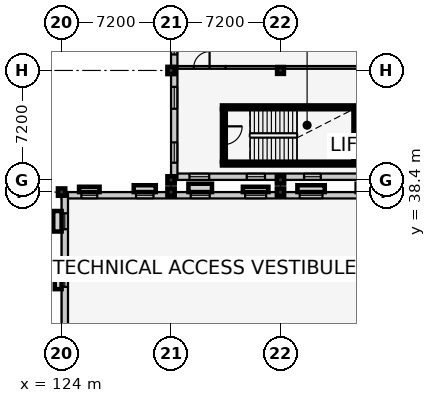
"""IFC4 building model, lengths in metres.
Left out: names, types, materials, properties, quantities, classifications, styles, units other than length and angle.
Written with IfcOpenShell. Run it as: python <this file> out.ifc"""

import sys

from ifc_helpers import new_model, si_unit, direction, frame, frame_2d, origin, origin_2d, place, context, subcontext, project, spatial, rectangle, extrude, element, fill, save


model = new_model("IFC4")
c1 = context("Model", 3, precision=1e-05, world=origin(), true_north=direction((0.0, 1.0)))
c2 = subcontext(c1, "Body", "Model", "MODEL_VIEW")
j1 = project(units=[si_unit("LENGTHUNIT", "METRE"), si_unit("PLANEANGLEUNIT", "RADIAN")], contexts=[c1])
p1 = place(None, origin())
s1 = spatial("IfcSite", under=j1, at=p1, CompositionType="ELEMENT")
p2 = place(p1, origin())
s2 = spatial("IfcBuilding", under=s1, at=p2, CompositionType="ELEMENT")
p3 = place(p2, frame((0.0, 0.0, 9.6)))
s3 = spatial("IfcBuildingStorey", under=s2, at=p3, CompositionType="ELEMENT", Elevation=9.6)
for number, where, z_axis, x_axis in (
    (1, (124.0, 38.4, 0.0), (0.0, 0.0, 1.0), (1.0, 0.0, 0.0)),
    (2, (131.2, 38.4, 0.0), (0.0, 0.0, 1.0), (1.0, 0.0, 0.0)),
    (3, (138.4, 38.4, 0.0), (0.0, 0.0, 1.0), (1.0, 0.0, 0.0)),
    (4, (131.2, 39.2, 0.0), (0.0, 0.0, 1.0), (1.0, 0.0, 0.0)),
    (5, (131.2, 46.4, 0.0), (0.0, 0.0, 1.0), (1.0, 0.0, 0.0)),
    (6, (138.4, 39.2, 0.0), (0.0, 0.0, 1.0), (1.0, 0.0, 0.0)),
):
    element("IfcColumn", number, at=place(p3, frame(where, z_axis=z_axis, x_axis=x_axis)), inside=s3, PredefinedType="COLUMN", context=c2, shape_type="SweptSolid", body=[
        extrude(rectangle(XDim=0.48, YDim=0.48, at=origin_2d()), origin(), (0.0, 0.0, 1.0), 4.2),
    ])
p4 = place(p3, frame((138.4, 46.4, 0.0), z_axis=(0.0, 0.0, 1.0), x_axis=(1.0, 0.0, 0.0)))
e7 = element("IfcColumn", 7, at=p4, inside=s3, PredefinedType="COLUMN", context=c2, shape_type="SweptSolid", body=[
    extrude(rectangle(XDim=0.45, YDim=0.45, at=origin_2d()), origin(), (0.0, 0.0, 1.0), 4.2),
])
p5 = place(p3, frame((124.0, 38.19, 0.0), z_axis=(0.0, 0.0, 1.0), x_axis=(1.0, 0.0, 0.0)))
e8 = element("IfcWall", 8, at=p5, inside=s3, PredefinedType="SOLIDWALL", context=c2, shape_type="SweptSolid", body=[
    extrude(rectangle(XDim=62.0, YDim=0.42, at=frame_2d((31.0, 0.0))), origin(), (0.0, 0.0, 1.0), 3.675),
])
p6 = place(p5, frame((1.299, 0.0, 0.9)))
e9 = element("IfcOpeningElement", 9, at=p6, cuts=e8, PredefinedType="OPENING", context=c2, shape_type="SweptSolid", body=[
    extrude(rectangle(XDim=1.05, YDim=1.6, at=frame_2d((0.525, 0.8))), frame((0.0, 0.222, 0.0), z_axis=(0.0, -1.0, 0.0), x_axis=(1.0, 0.0, 0.0)), (0.0, 0.0, 1.0), 0.444),
])
p7 = place(p5, frame((4.896, 0.0, 0.9)))
e10 = element("IfcOpeningElement", 10, at=p7, cuts=e8, PredefinedType="OPENING", context=c2, shape_type="SweptSolid", body=[
    extrude(rectangle(XDim=1.15, YDim=1.6, at=frame_2d((0.575, 0.8))), frame((0.0, 0.222, 0.0), z_axis=(0.0, -1.0, 0.0), x_axis=(1.0, 0.0, 0.0)), (0.0, 0.0, 1.0), 0.444),
])
p8 = place(p5, frame((8.493, 0.0, 0.9)))
e11 = element("IfcOpeningElement", 11, at=p8, cuts=e8, PredefinedType="OPENING", context=c2, shape_type="SweptSolid", body=[
    extrude(rectangle(XDim=1.25, YDim=1.6, at=frame_2d((0.625, 0.8))), frame((0.0, 0.222, 0.0), z_axis=(0.0, -1.0, 0.0), x_axis=(1.0, 0.0, 0.0)), (0.0, 0.0, 1.0), 0.444),
])
p9 = place(p5, frame((12.075, 0.0, 0.9)))
e12 = element("IfcOpeningElement", 12, at=p9, cuts=e8, PredefinedType="OPENING", context=c2, shape_type="SweptSolid", body=[
    extrude(rectangle(XDim=1.38, YDim=1.6, at=frame_2d((0.69, 0.8))), frame((0.0, 0.222, 0.0), z_axis=(0.0, -1.0, 0.0), x_axis=(1.0, 0.0, 0.0)), (0.0, 0.0, 1.0), 0.444),
])
p10 = place(p5, frame((15.662, 0.0, 0.9)))
e13 = element("IfcOpeningElement", 13, at=p10, cuts=e8, PredefinedType="OPENING", context=c2, shape_type="SweptSolid", body=[
    extrude(rectangle(XDim=1.5, YDim=1.6, at=frame_2d((0.75, 0.8))), frame((0.0, 0.222, 0.0), z_axis=(0.0, -1.0, 0.0), x_axis=(1.0, 0.0, 0.0)), (0.0, 0.0, 1.0), 0.444),
])
p11 = place(p5, frame((19.559, 0.0, 0.9)))
e14 = element("IfcOpeningElement", 14, at=p11, cuts=e8, PredefinedType="OPENING", context=c2, shape_type="SweptSolid", body=[
    extrude(rectangle(XDim=1.0, YDim=1.75, at=frame_2d((0.5, 0.875))), frame((0.0, 0.222, 0.0), z_axis=(0.0, -1.0, 0.0), x_axis=(1.0, 0.0, 0.0)), (0.0, 0.0, 1.0), 0.444),
])
p12 = place(p5, frame((26.733, 0.0, 0.9)))
e15 = element("IfcOpeningElement", 15, at=p12, cuts=e8, PredefinedType="OPENING", context=c2, shape_type="SweptSolid", body=[
    extrude(rectangle(XDim=1.24, YDim=1.75, at=frame_2d((0.62, 0.875))), frame((0.0, 0.222, 0.0), z_axis=(0.0, -1.0, 0.0), x_axis=(1.0, 0.0, 0.0)), (0.0, 0.0, 1.0), 0.444),
])
p13 = place(p5, frame((37.544, 0.0, 0.9)))
e16 = element("IfcOpeningElement", 16, at=p13, cuts=e8, PredefinedType="OPENING", context=c2, shape_type="SweptSolid", body=[
    extrude(rectangle(XDim=1.5, YDim=1.75, at=frame_2d((0.75, 0.875))), frame((0.0, 0.222, 0.0), z_axis=(0.0, -1.0, 0.0), x_axis=(1.0, 0.0, 0.0)), (0.0, 0.0, 1.0), 0.444),
])
p14 = place(p5, frame((48.685, 0.0, 0.9)))
e17 = element("IfcOpeningElement", 17, at=p14, cuts=e8, PredefinedType="OPENING", context=c2, shape_type="SweptSolid", body=[
    extrude(rectangle(XDim=1.1, YDim=1.35, at=frame_2d((0.55, 0.675))), frame((0.0, 0.222, 0.0), z_axis=(0.0, -1.0, 0.0), x_axis=(1.0, 0.0, 0.0)), (0.0, 0.0, 1.0), 0.444),
])
p15 = place(p5, frame((59.477, 0.0, 0.9)))
e18 = element("IfcOpeningElement", 18, at=p15, cuts=e8, PredefinedType="OPENING", context=c2, shape_type="SweptSolid", body=[
    extrude(rectangle(XDim=1.4, YDim=1.35, at=frame_2d((0.7, 0.675))), frame((0.0, 0.222, 0.0), z_axis=(0.0, -1.0, 0.0), x_axis=(1.0, 0.0, 0.0)), (0.0, 0.0, 1.0), 0.444),
])
p16 = place(p3, frame((124.21, 0.0, 0.0), z_axis=(0.0, 0.0, 1.0), x_axis=(0.0, 1.0, 0.0)))
e19 = element("IfcWall", 19, at=p16, inside=s3, PredefinedType="SOLIDWALL", context=c2, shape_type="SweptSolid", body=[
    extrude(rectangle(XDim=38.4, YDim=0.42, at=frame_2d((19.2, 0.0))), origin(), (0.0, 0.0, 1.0), 3.825),
])
p17 = place(p16, frame((32.165, 0.0, 0.9)))
e20 = element("IfcOpeningElement", 20, at=p17, cuts=e19, PredefinedType="OPENING", context=c2, shape_type="SweptSolid", body=[
    extrude(rectangle(XDim=0.95, YDim=1.45, at=frame_2d((0.475, 0.725))), frame((0.0, 0.222, 0.0), z_axis=(0.0, -1.0, 0.0), x_axis=(1.0, 0.0, 0.0)), (0.0, 0.0, 1.0), 0.444),
])
p18 = place(p16, frame((35.955, 0.0, 0.9)))
e21 = element("IfcOpeningElement", 21, at=p18, cuts=e19, PredefinedType="OPENING", context=c2, shape_type="SweptSolid", body=[
    extrude(rectangle(XDim=1.05, YDim=1.45, at=frame_2d((0.525, 0.725))), frame((0.0, 0.222, 0.0), z_axis=(0.0, -1.0, 0.0), x_axis=(1.0, 0.0, 0.0)), (0.0, 0.0, 1.0), 0.444),
])
p19 = place(p3, frame((168.4, 39.41, 0.0), z_axis=(0.0, 0.0, 1.0), x_axis=(-1.0, 0.0, 0.0)))
e22 = element("IfcWall", 22, at=p19, inside=s3, PredefinedType="SOLIDWALL", context=c2, shape_type="SweptSolid", body=[
    extrude(rectangle(XDim=37.2, YDim=0.42, at=frame_2d((18.6, 0.0))), origin(), (0.0, 0.0, 1.0), 3.115),
])
p20 = place(p19, frame((1.3, 0.0, 0.9)))
e23 = element("IfcOpeningElement", 23, at=p20, cuts=e22, PredefinedType="OPENING", context=c2, shape_type="SweptSolid", body=[
    extrude(rectangle(XDim=1.12, YDim=1.75, at=frame_2d((0.56, 0.875))), frame((0.0, 0.222, 0.0), z_axis=(0.0, -1.0, 0.0), x_axis=(1.0, 0.0, 0.0)), (0.0, 0.0, 1.0), 0.444),
])
p21 = place(p19, frame((4.96, 0.0, 0.9)))
e24 = element("IfcOpeningElement", 24, at=p21, cuts=e22, PredefinedType="OPENING", context=c2, shape_type="SweptSolid", body=[
    extrude(rectangle(XDim=1.24, YDim=1.75, at=frame_2d((0.62, 0.875))), frame((0.0, 0.222, 0.0), z_axis=(0.0, -1.0, 0.0), x_axis=(1.0, 0.0, 0.0)), (0.0, 0.0, 1.0), 0.444),
])
p22 = place(p19, frame((12.3, 0.0, 0.9)))
e25 = element("IfcOpeningElement", 25, at=p22, cuts=e22, PredefinedType="OPENING", context=c2, shape_type="SweptSolid", body=[
    extrude(rectangle(XDim=1.44, YDim=1.75, at=frame_2d((0.72, 0.875))), frame((0.0, 0.222, 0.0), z_axis=(0.0, -1.0, 0.0), x_axis=(1.0, 0.0, 0.0)), (0.0, 0.0, 1.0), 0.444),
])
p23 = place(p19, frame((20.01, 0.0, 0.9)))
e26 = element("IfcOpeningElement", 26, at=p23, cuts=e22, PredefinedType="OPENING", context=c2, shape_type="SweptSolid", body=[
    extrude(rectangle(XDim=0.9, YDim=1.35, at=frame_2d((0.45, 0.675))), frame((0.0, 0.222, 0.0), z_axis=(0.0, -1.0, 0.0), x_axis=(1.0, 0.0, 0.0)), (0.0, 0.0, 1.0), 0.444),
])
p24 = place(p19, frame((23.68, 0.0, 0.9)))
e27 = element("IfcOpeningElement", 27, at=p24, cuts=e22, PredefinedType="OPENING", context=c2, shape_type="SweptSolid", body=[
    extrude(rectangle(XDim=1.0, YDim=1.35, at=frame_2d((0.5, 0.675))), frame((0.0, 0.222, 0.0), z_axis=(0.0, -1.0, 0.0), x_axis=(1.0, 0.0, 0.0)), (0.0, 0.0, 1.0), 0.444),
])
p25 = place(p19, frame((27.35, 0.0, 0.9)))
e28 = element("IfcOpeningElement", 28, at=p25, cuts=e22, PredefinedType="OPENING", context=c2, shape_type="SweptSolid", body=[
    extrude(rectangle(XDim=1.1, YDim=1.35, at=frame_2d((0.55, 0.675))), frame((0.0, 0.222, 0.0), z_axis=(0.0, -1.0, 0.0), x_axis=(1.0, 0.0, 0.0)), (0.0, 0.0, 1.0), 0.444),
])
p26 = place(p19, frame((31.02, 0.0, 0.9)))
e29 = element("IfcOpeningElement", 29, at=p26, cuts=e22, PredefinedType="OPENING", context=c2, shape_type="SweptSolid", body=[
    extrude(rectangle(XDim=1.2, YDim=1.35, at=frame_2d((0.6, 0.675))), frame((0.0, 0.222, 0.0), z_axis=(0.0, -1.0, 0.0), x_axis=(1.0, 0.0, 0.0)), (0.0, 0.0, 1.0), 0.444),
])
p27 = place(p19, frame((34.69, 0.0, 0.9)))
e30 = element("IfcOpeningElement", 30, at=p27, cuts=e22, PredefinedType="OPENING", context=c2, shape_type="SweptSolid", body=[
    extrude(rectangle(XDim=1.3, YDim=1.35, at=frame_2d((0.65, 0.675))), frame((0.0, 0.222, 0.0), z_axis=(0.0, -1.0, 0.0), x_axis=(1.0, 0.0, 0.0)), (0.0, 0.0, 1.0), 0.444),
])
p28 = place(p3, frame((131.41, 39.2, 0.0), z_axis=(0.0, 0.0, 1.0), x_axis=(0.0, 1.0, 0.0)))
e31 = element("IfcWall", 31, at=p28, inside=s3, PredefinedType="SOLIDWALL", context=c2, shape_type="SweptSolid", body=[
    extrude(rectangle(XDim=21.6, YDim=0.42, at=frame_2d((10.8, 0.0))), origin(), (0.0, 0.0, 1.0), 3.355),
])
p29 = place(p28, frame((1.13, 0.0, 0.9)))
e32 = element("IfcOpeningElement", 32, at=p29, cuts=e31, PredefinedType="OPENING", context=c2, shape_type="SweptSolid", body=[
    extrude(rectangle(XDim=1.34, YDim=1.75, at=frame_2d((0.67, 0.875))), frame((0.0, 0.222, 0.0), z_axis=(0.0, -1.0, 0.0), x_axis=(1.0, 0.0, 0.0)), (0.0, 0.0, 1.0), 0.444),
])
p30 = place(p28, frame((4.68, 0.0, 0.9)))
e33 = element("IfcOpeningElement", 33, at=p30, cuts=e31, PredefinedType="OPENING", context=c2, shape_type="SweptSolid", body=[
    extrude(rectangle(XDim=1.44, YDim=1.75, at=frame_2d((0.72, 0.875))), frame((0.0, 0.222, 0.0), z_axis=(0.0, -1.0, 0.0), x_axis=(1.0, 0.0, 0.0)), (0.0, 0.0, 1.0), 0.444),
])
p31 = place(p28, frame((8.25, 0.0, 0.9)))
e34 = element("IfcOpeningElement", 34, at=p31, cuts=e31, PredefinedType="OPENING", context=c2, shape_type="SweptSolid", body=[
    extrude(rectangle(XDim=1.5, YDim=1.75, at=frame_2d((0.75, 0.875))), frame((0.0, 0.222, 0.0), z_axis=(0.0, -1.0, 0.0), x_axis=(1.0, 0.0, 0.0)), (0.0, 0.0, 1.0), 0.444),
])
p32 = place(p28, frame((12.15, 0.0, 0.9)))
e35 = element("IfcOpeningElement", 35, at=p32, cuts=e31, PredefinedType="OPENING", context=c2, shape_type="SweptSolid", body=[
    extrude(rectangle(XDim=0.9, YDim=1.35, at=frame_2d((0.45, 0.675))), frame((0.0, 0.222, 0.0), z_axis=(0.0, -1.0, 0.0), x_axis=(1.0, 0.0, 0.0)), (0.0, 0.0, 1.0), 0.444),
])
p33 = place(p28, frame((15.7, 0.0, 0.9)))
e36 = element("IfcOpeningElement", 36, at=p33, cuts=e31, PredefinedType="OPENING", context=c2, shape_type="SweptSolid", body=[
    extrude(rectangle(XDim=1.0, YDim=1.35, at=frame_2d((0.5, 0.675))), frame((0.0, 0.222, 0.0), z_axis=(0.0, -1.0, 0.0), x_axis=(1.0, 0.0, 0.0)), (0.0, 0.0, 1.0), 0.444),
])
p34 = place(p28, frame((19.25, 0.0, 0.9)))
e37 = element("IfcOpeningElement", 37, at=p34, cuts=e31, PredefinedType="OPENING", context=c2, shape_type="SweptSolid", body=[
    extrude(rectangle(XDim=1.1, YDim=1.35, at=frame_2d((0.55, 0.675))), frame((0.0, 0.222, 0.0), z_axis=(0.0, -1.0, 0.0), x_axis=(1.0, 0.0, 0.0)), (0.0, 0.0, 1.0), 0.444),
])
p35 = place(p3, frame((134.55, 40.275, 0.0), z_axis=(0.0, 0.0, 1.0), x_axis=(1.0, 0.0, 0.0)))
e38 = element("IfcWall", 38, at=p35, inside=s3, PredefinedType="SHEAR", context=c2, shape_type="SweptSolid", body=[
    extrude(rectangle(XDim=9.47, YDim=0.25, at=frame_2d((4.735, 0.0))), origin(), (0.0, 0.0, 1.0), 3.96),
])
p36 = place(p3, frame((143.45, 43.975, 0.0), z_axis=(0.0, 0.0, 1.0), x_axis=(-1.0, 0.0, 0.0)))
e39 = element("IfcWall", 39, at=p36, inside=s3, PredefinedType="SHEAR", context=c2, shape_type="SweptSolid", body=[
    extrude(rectangle(XDim=8.9, YDim=0.25, at=frame_2d((4.45, 0.0))), origin(), (0.0, 0.0, 1.0), 3.96),
])
p37 = place(p3, frame((134.675, 43.85, 0.0), z_axis=(0.0, 0.0, 1.0), x_axis=(0.0, -1.0, 0.0)))
e40 = element("IfcWall", 40, at=p37, inside=s3, PredefinedType="SHEAR", context=c2, shape_type="SweptSolid", body=[
    extrude(rectangle(XDim=3.45, YDim=0.25, at=frame_2d((1.725, 0.0))), origin(), (0.0, 0.0, 1.0), 3.96),
])
p38 = place(p37, frame((1.125, 0.0, 0.0)))
e41 = element("IfcOpeningElement", 41, at=p38, cuts=e40, PredefinedType="OPENING", context=c2, shape_type="SweptSolid", body=[
    extrude(rectangle(XDim=1.2, YDim=2.15, at=frame_2d((0.6, 1.075))), frame((0.0, 0.137, 0.0), z_axis=(0.0, -1.0, 0.0), x_axis=(1.0, 0.0, 0.0)), (0.0, 0.0, 1.0), 0.274),
])
p39 = place(p3, frame((143.325, 40.4, 0.0), z_axis=(0.0, 0.0, 1.0), x_axis=(0.0, 1.0, 0.0)))
e42 = element("IfcWall", 42, at=p39, inside=s3, PredefinedType="SHEAR", context=c2, shape_type="SweptSolid", body=[
    extrude(rectangle(XDim=3.45, YDim=0.25, at=frame_2d((1.725, 0.0))), origin(), (0.0, 0.0, 1.0), 3.96),
])
p40 = place(p3, frame((131.63, 46.6, 0.0), z_axis=(0.0, 0.0, 1.0), x_axis=(1.0, 0.0, 0.0)))
e43 = element("IfcWall", 43, at=p40, inside=s3, PredefinedType="PARTITIONING", context=c2, shape_type="SweptSolid", body=[
    extrude(rectangle(XDim=3.17, YDim=0.18, at=frame_2d((1.585, 0.0))), origin(), (0.0, 0.0, 1.0), 3.285),
])
p41 = place(p40, frame((1.065, 0.0, 0.0)))
e44 = element("IfcOpeningElement", 44, at=p41, cuts=e43, PredefinedType="OPENING", context=c2, shape_type="SweptSolid", body=[
    extrude(rectangle(XDim=1.04, YDim=2.15, at=frame_2d((0.52, 1.075))), frame((0.0, 0.102, 0.0), z_axis=(0.0, -1.0, 0.0), x_axis=(1.0, 0.0, 0.0)), (0.0, 0.0, 1.0), 0.204),
])
p42 = place(p3, frame((134.8, 46.6, 0.0), z_axis=(0.0, 0.0, 1.0), x_axis=(1.0, 0.0, 0.0)))
e45 = element("IfcWall", 45, at=p42, inside=s3, PredefinedType="PARTITIONING", context=c2, shape_type="SweptSolid", body=[
    extrude(rectangle(XDim=33.17, YDim=0.18, at=frame_2d((16.585, 0.0))), origin(), (0.0, 0.0, 1.0), 2.835),
])
p43 = place(p42, frame((22.675, 0.0, 0.0)))
e46 = element("IfcOpeningElement", 46, at=p43, cuts=e45, PredefinedType="OPENING", context=c2, shape_type="SweptSolid", body=[
    extrude(rectangle(XDim=1.02, YDim=2.12, at=frame_2d((0.51, 1.06))), frame((0.0, 0.102, 0.0), z_axis=(0.0, -1.0, 0.0), x_axis=(1.0, 0.0, 0.0)), (0.0, 0.0, 1.0), 0.204),
])
p44 = place(p6, origin())
e47 = element("IfcWindow", 47, at=p44, inside=s3, PartitioningType="SINGLE_PANEL", PredefinedType="WINDOW", context=c2, shape_type="SweptSolid", body=[
    extrude(rectangle(XDim=1.05, YDim=1.6, at=frame_2d((0.525, 0.8))), frame((0.0, 0.03, 0.0), z_axis=(0.0, -1.0, 0.0), x_axis=(1.0, 0.0, 0.0)), (0.0, 0.0, 1.0), 0.06),
])
fill(e9, e47)
p45 = place(p7, origin())
e48 = element("IfcWindow", 48, at=p45, inside=s3, PartitioningType="SINGLE_PANEL", PredefinedType="WINDOW", context=c2, shape_type="SweptSolid", body=[
    extrude(rectangle(XDim=1.15, YDim=1.6, at=frame_2d((0.575, 0.8))), frame((0.0, 0.03, 0.0), z_axis=(0.0, -1.0, 0.0), x_axis=(1.0, 0.0, 0.0)), (0.0, 0.0, 1.0), 0.06),
])
fill(e10, e48)
p46 = place(p8, origin())
e49 = element("IfcWindow", 49, at=p46, inside=s3, PartitioningType="SINGLE_PANEL", PredefinedType="WINDOW", context=c2, shape_type="SweptSolid", body=[
    extrude(rectangle(XDim=1.25, YDim=1.6, at=frame_2d((0.625, 0.8))), frame((0.0, 0.03, 0.0), z_axis=(0.0, -1.0, 0.0), x_axis=(1.0, 0.0, 0.0)), (0.0, 0.0, 1.0), 0.06),
])
fill(e11, e49)
p47 = place(p9, origin())
e50 = element("IfcWindow", 50, at=p47, inside=s3, PartitioningType="SINGLE_PANEL", PredefinedType="WINDOW", context=c2, shape_type="SweptSolid", body=[
    extrude(rectangle(XDim=1.38, YDim=1.6, at=frame_2d((0.69, 0.8))), frame((0.0, 0.03, 0.0), z_axis=(0.0, -1.0, 0.0), x_axis=(1.0, 0.0, 0.0)), (0.0, 0.0, 1.0), 0.06),
])
fill(e12, e50)
p48 = place(p10, origin())
e51 = element("IfcWindow", 51, at=p48, inside=s3, PartitioningType="SINGLE_PANEL", PredefinedType="WINDOW", context=c2, shape_type="SweptSolid", body=[
    extrude(rectangle(XDim=1.5, YDim=1.6, at=frame_2d((0.75, 0.8))), frame((0.0, 0.03, 0.0), z_axis=(0.0, -1.0, 0.0), x_axis=(1.0, 0.0, 0.0)), (0.0, 0.0, 1.0), 0.06),
])
fill(e13, e51)
p49 = place(p17, origin())
e52 = element("IfcWindow", 52, at=p49, inside=s3, PartitioningType="SINGLE_PANEL", PredefinedType="WINDOW", context=c2, shape_type="SweptSolid", body=[
    extrude(rectangle(XDim=0.95, YDim=1.45, at=frame_2d((0.475, 0.725))), frame((0.0, 0.03, 0.0), z_axis=(0.0, -1.0, 0.0), x_axis=(1.0, 0.0, 0.0)), (0.0, 0.0, 1.0), 0.06),
])
fill(e20, e52)
p50 = place(p18, origin())
e53 = element("IfcWindow", 53, at=p50, inside=s3, PartitioningType="SINGLE_PANEL", PredefinedType="WINDOW", context=c2, shape_type="SweptSolid", body=[
    extrude(rectangle(XDim=1.05, YDim=1.45, at=frame_2d((0.525, 0.725))), frame((0.0, 0.03, 0.0), z_axis=(0.0, -1.0, 0.0), x_axis=(1.0, 0.0, 0.0)), (0.0, 0.0, 1.0), 0.06),
])
fill(e21, e53)
p51 = place(p25, origin())
e54 = element("IfcWindow", 54, at=p51, inside=s3, PartitioningType="SINGLE_PANEL", PredefinedType="WINDOW", context=c2, shape_type="SweptSolid", body=[
    extrude(rectangle(XDim=1.1, YDim=1.35, at=frame_2d((0.55, 0.675))), frame((0.0, 0.03, 0.0), z_axis=(0.0, -1.0, 0.0), x_axis=(1.0, 0.0, 0.0)), (0.0, 0.0, 1.0), 0.06),
])
fill(e28, e54)
p52 = place(p26, origin())
e55 = element("IfcWindow", 55, at=p52, inside=s3, PartitioningType="SINGLE_PANEL", PredefinedType="WINDOW", context=c2, shape_type="SweptSolid", body=[
    extrude(rectangle(XDim=1.2, YDim=1.35, at=frame_2d((0.6, 0.675))), frame((0.0, 0.03, 0.0), z_axis=(0.0, -1.0, 0.0), x_axis=(1.0, 0.0, 0.0)), (0.0, 0.0, 1.0), 0.06),
])
fill(e29, e55)
p53 = place(p27, origin())
e56 = element("IfcWindow", 56, at=p53, inside=s3, PartitioningType="SINGLE_PANEL", PredefinedType="WINDOW", context=c2, shape_type="SweptSolid", body=[
    extrude(rectangle(XDim=1.3, YDim=1.35, at=frame_2d((0.65, 0.675))), frame((0.0, 0.03, 0.0), z_axis=(0.0, -1.0, 0.0), x_axis=(1.0, 0.0, 0.0)), (0.0, 0.0, 1.0), 0.06),
])
fill(e30, e56)
p54 = place(p29, origin())
e57 = element("IfcWindow", 57, at=p54, inside=s3, PartitioningType="SINGLE_PANEL", PredefinedType="WINDOW", context=c2, shape_type="SweptSolid", body=[
    extrude(rectangle(XDim=1.34, YDim=1.75, at=frame_2d((0.67, 0.875))), frame((0.0, 0.03, 0.0), z_axis=(0.0, -1.0, 0.0), x_axis=(1.0, 0.0, 0.0)), (0.0, 0.0, 1.0), 0.06),
])
fill(e32, e57)
p55 = place(p30, origin())
e58 = element("IfcWindow", 58, at=p55, inside=s3, PartitioningType="SINGLE_PANEL", PredefinedType="WINDOW", context=c2, shape_type="SweptSolid", body=[
    extrude(rectangle(XDim=1.44, YDim=1.75, at=frame_2d((0.72, 0.875))), frame((0.0, 0.03, 0.0), z_axis=(0.0, -1.0, 0.0), x_axis=(1.0, 0.0, 0.0)), (0.0, 0.0, 1.0), 0.06),
])
fill(e33, e58)
p56 = place(p31, origin())
e59 = element("IfcWindow", 59, at=p56, inside=s3, PartitioningType="SINGLE_PANEL", PredefinedType="WINDOW", context=c2, shape_type="SweptSolid", body=[
    extrude(rectangle(XDim=1.5, YDim=1.75, at=frame_2d((0.75, 0.875))), frame((0.0, 0.03, 0.0), z_axis=(0.0, -1.0, 0.0), x_axis=(1.0, 0.0, 0.0)), (0.0, 0.0, 1.0), 0.06),
])
fill(e34, e59)
p57 = place(p38, origin())
e60 = element("IfcDoor", 60, at=p57, inside=s3, OperationType="SINGLE_SWING_LEFT", PredefinedType="DOOR", context=c2, shape_type="SweptSolid", body=[
    extrude(rectangle(XDim=1.2, YDim=2.15, at=frame_2d((0.6, 1.075))), frame((0.0, 0.025, 0.0), z_axis=(0.0, -1.0, 0.0), x_axis=(1.0, 0.0, 0.0)), (0.0, 0.0, 1.0), 0.05),
])
fill(e41, e60)
p58 = place(p41, origin())
e61 = element("IfcDoor", 61, at=p58, inside=s3, OperationType="SINGLE_SWING_RIGHT", PredefinedType="DOOR", context=c2, shape_type="SweptSolid", body=[
    extrude(rectangle(XDim=1.04, YDim=2.15, at=frame_2d((0.52, 1.075))), frame((0.0, 0.025, 0.0), z_axis=(0.0, -1.0, 0.0), x_axis=(1.0, 0.0, 0.0)), (0.0, 0.0, 1.0), 0.05),
])
fill(e44, e61)
save(model, sys.argv[1])
